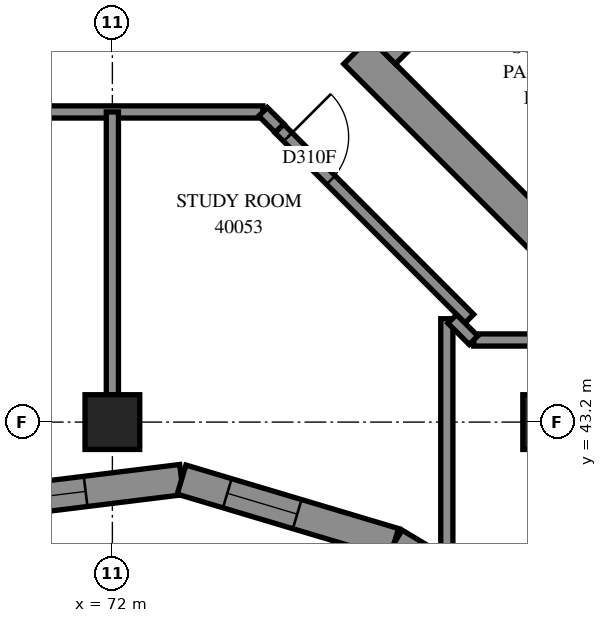
"""IFC4 building model, lengths in metres.
Left out: names, types, materials, properties, quantities, classifications, styles, units other than length and angle.
Written with IfcOpenShell. Run it as: python <this file> out.ifc"""

import sys

from ifc_helpers import new_model, si_unit, direction, frame, frame_2d, origin, origin_2d, place, context, subcontext, project, spatial, polyline, rectangle, outline, extrude, element, fill, save


model = new_model("IFC4")
c1 = context("Model", 3, precision=1e-05, world=origin(), true_north=direction((0.0, 1.0)))
c2 = subcontext(c1, "Body", "Model", "MODEL_VIEW")
j1 = project(units=[si_unit("LENGTHUNIT", "METRE"), si_unit("PLANEANGLEUNIT", "RADIAN")], contexts=[c1])
p1 = place(None, origin())
s1 = spatial("IfcSite", under=j1, at=p1, CompositionType="ELEMENT")
p2 = place(p1, origin())
s2 = spatial("IfcBuilding", under=s1, at=p2, CompositionType="ELEMENT")
p3 = place(p2, frame((0.0, 0.0, 149.0)))
s3 = spatial("IfcBuildingStorey", under=s2, at=p3, CompositionType="ELEMENT", Elevation=149.0)
for number, where, z_axis, x_axis in (
    (1, (72.0, 43.2, 0.0), (0.0, 0.0, 1.0), (1.0, 0.0, 0.0)),
    (2, (79.2, 43.2, 0.0), (0.0, 0.0, 1.0), (1.0, 0.0, 0.0)),
):
    element("IfcColumn", number, at=place(p3, frame(where, z_axis=z_axis, x_axis=x_axis)), inside=s3, PredefinedType="COLUMN", context=c2, shape_type="SweptSolid", body=[
        extrude(rectangle(XDim=0.9, YDim=0.9, at=origin_2d()), origin(), (0.0, 0.0, 1.0), 3.1),
    ])
p4 = place(p3, frame((76.018, 49.302, -0.3), z_axis=(0.0, 0.0, 1.0), x_axis=(0.7071067812, -0.7071067812, 0.0)))
e3 = element("IfcWall", 3, at=p4, inside=s3, PredefinedType="SHEAR", context=c2, shape_type="SweptSolid", body=[
    extrude(rectangle(XDim=15.6, YDim=0.6, at=frame_2d((7.8, 0.0))), origin(), (0.0, 0.0, 1.0), 2.7),
])
p5 = place(p3, frame((76.442, 49.302, -0.3), z_axis=(0.0, 0.0, 1.0), x_axis=(0.7071067812, 0.7071067812, 0.0)))
e4 = element("IfcWall", 4, at=p5, inside=s3, PredefinedType="SHEAR", context=c2, shape_type="SweptSolid", body=[
    extrude(rectangle(XDim=14.4, YDim=0.6, at=frame_2d((7.2, 0.0))), origin(), (0.0, 0.0, 1.0), 2.7),
])
p6 = place(p5, frame((4.55, 0.0, 0.3)))
e5 = element("IfcOpeningElement", 5, at=p6, cuts=e4, PredefinedType="OPENING", context=c2, shape_type="SweptSolid", body=[
    extrude(rectangle(XDim=1.1, YDim=2.1, at=frame_2d((0.55, 1.05))), frame((0.0, 0.31, 0.0), z_axis=(0.0, -1.0, 0.0), x_axis=(1.0, 0.0, 0.0)), (0.0, 0.0, 1.0), 0.62),
])
p7 = place(p5, frame((11.35, 0.0, 0.3)))
e6 = element("IfcOpeningElement", 6, at=p7, cuts=e4, PredefinedType="OPENING", context=c2, shape_type="SweptSolid", body=[
    extrude(rectangle(XDim=1.1, YDim=2.1, at=frame_2d((0.55, 1.05))), frame((0.0, 0.31, 0.0), z_axis=(0.0, -1.0, 0.0), x_axis=(1.0, 0.0, 0.0)), (0.0, 0.0, 1.0), 0.62),
])
p8 = place(p3, frame((69.7, 41.831, 0.0), z_axis=(0.0, 0.0, 1.0), x_axis=(0.99249528, 0.1222829472, 0.0)))
e7 = element("IfcWall", 7, at=p8, inside=s3, PredefinedType="SOLIDWALL", context=c2, shape_type="SweptSolid", body=[
    extrude(outline(polyline([(-0.031, -0.25), (3.412, -0.25), (3.516, 0.25), (0.031, 0.25), (-0.031, -0.25)])), origin(), (0.0, 0.0, 1.0), 3.1),
])
p9 = place(p8, frame((0.674, 0.0, 0.45)))
e8 = element("IfcOpeningElement", 8, at=p9, cuts=e7, PredefinedType="OPENING", context=c2, shape_type="SweptSolid", body=[
    extrude(rectangle(XDim=1.2, YDim=2.5, at=frame_2d((0.6, 1.25))), frame((0.0, 0.26, 0.0), z_axis=(0.0, -1.0, 0.0), x_axis=(1.0, 0.0, 0.0)), (0.0, 0.0, 1.0), 0.52),
])
p10 = place(p3, frame((73.138, 42.255, 0.0), z_axis=(0.0, 0.0, 1.0), x_axis=(0.9581356877, -0.2863145194, 0.0)))
e9 = element("IfcWall", 9, at=p10, inside=s3, PredefinedType="SOLIDWALL", context=c2, shape_type="SweptSolid", body=[
    extrude(outline(polyline([(0.052, -0.25), (3.618, -0.25), (3.681, 0.25), (-0.052, 0.25), (0.052, -0.25)])), origin(), (0.0, 0.0, 1.0), 3.1),
])
p11 = place(p10, frame((0.785, 0.0, 0.45)))
e10 = element("IfcOpeningElement", 10, at=p11, cuts=e9, PredefinedType="OPENING", context=c2, shape_type="SweptSolid", body=[
    extrude(rectangle(XDim=1.2, YDim=2.5, at=frame_2d((0.6, 1.25))), frame((0.0, 0.26, 0.0), z_axis=(0.0, -1.0, 0.0), x_axis=(1.0, 0.0, 0.0)), (0.0, 0.0, 1.0), 0.52),
])
p12 = place(p3, frame((76.635, 41.21, 0.0), z_axis=(0.0, 0.0, 1.0), x_axis=(0.8582520879, -0.513228364, 0.0)))
e11 = element("IfcWall", 11, at=p12, inside=s3, PredefinedType="SOLIDWALL", context=c2, shape_type="SweptSolid", body=[
    extrude(outline(polyline([(0.031, -0.25), (4.216, -0.25), (4.304, 0.25), (-0.031, 0.25), (0.031, -0.25)])), origin(), (0.0, 0.0, 1.0), 3.1),
])
p13 = place(p12, frame((0.347, 0.0, 0.45)))
e12 = element("IfcOpeningElement", 12, at=p13, cuts=e11, PredefinedType="OPENING", context=c2, shape_type="SweptSolid", body=[
    extrude(rectangle(XDim=1.2, YDim=2.5, at=frame_2d((0.6, 1.25))), frame((0.0, 0.26, 0.0), z_axis=(0.0, -1.0, 0.0), x_axis=(1.0, 0.0, 0.0)), (0.0, 0.0, 1.0), 0.52),
])
p14 = place(p12, frame((2.727, 0.0, 0.45)))
e13 = element("IfcOpeningElement", 13, at=p14, cuts=e11, PredefinedType="OPENING", context=c2, shape_type="SweptSolid", body=[
    extrude(rectangle(XDim=1.2, YDim=2.5, at=frame_2d((0.6, 1.25))), frame((0.0, 0.26, 0.0), z_axis=(0.0, -1.0, 0.0), x_axis=(1.0, 0.0, 0.0)), (0.0, 0.0, 1.0), 0.52),
])
p15 = place(p3, frame((55.5, 48.3, 0.0), z_axis=(0.0, 0.0, 1.0), x_axis=(1.0, 0.0, 0.0)))
e14 = element("IfcWall", 14, at=p15, inside=s3, PredefinedType="PARTITIONING", context=c2, shape_type="SweptSolid", body=[
    extrude(rectangle(XDim=18.974, YDim=0.2, at=frame_2d((9.487, 0.0))), origin(), (0.0, 0.0, 1.0), 3.1),
])
p16 = place(p15, frame((4.4, 0.0, 0.0)))
e15 = element("IfcOpeningElement", 15, at=p16, cuts=e14, PredefinedType="OPENING", context=c2, shape_type="SweptSolid", body=[
    extrude(rectangle(XDim=0.9, YDim=2.1, at=frame_2d((0.45, 1.05))), frame((0.0, 0.11, 0.0), z_axis=(0.0, -1.0, 0.0), x_axis=(1.0, 0.0, 0.0)), (0.0, 0.0, 1.0), 0.22),
])
p17 = place(p15, frame((6.1, 0.0, 0.0)))
e16 = element("IfcOpeningElement", 16, at=p17, cuts=e14, PredefinedType="OPENING", context=c2, shape_type="SweptSolid", body=[
    extrude(rectangle(XDim=0.9, YDim=2.1, at=frame_2d((0.45, 1.05))), frame((0.0, 0.11, 0.0), z_axis=(0.0, -1.0, 0.0), x_axis=(1.0, 0.0, 0.0)), (0.0, 0.0, 1.0), 0.22),
])
p18 = place(p15, frame((13.162, 0.0, 0.0)))
e17 = element("IfcOpeningElement", 17, at=p18, cuts=e14, PredefinedType="OPENING", context=c2, shape_type="SweptSolid", body=[
    extrude(rectangle(XDim=1.0, YDim=2.1, at=frame_2d((0.5, 1.05))), frame((0.0, 0.11, 0.0), z_axis=(0.0, -1.0, 0.0), x_axis=(1.0, 0.0, 0.0)), (0.0, 0.0, 1.0), 0.22),
])
p19 = place(p3, frame((72.0, 43.65, 0.0), z_axis=(0.0, 0.0, 1.0), x_axis=(0.0, 1.0, 0.0)))
e18 = element("IfcWall", 18, at=p19, inside=s3, PredefinedType="PARTITIONING", context=c2, shape_type="SweptSolid", body=[
    extrude(rectangle(XDim=4.65, YDim=0.2, at=frame_2d((2.325, 0.0))), origin(), (0.0, 0.0, 1.0), 3.1),
])
p20 = place(p3, frame((74.745, 48.029, 0.0), z_axis=(0.0, 0.0, 1.0), x_axis=(0.7068806156, -0.7073328745, 0.0)))
e19 = element("IfcWall", 19, at=p20, inside=s3, PredefinedType="PARTITIONING", context=c2, shape_type="SweptSolid", body=[
    extrude(rectangle(XDim=4.422, YDim=0.2, at=frame_2d((2.211, 0.0))), origin(), (0.0, 0.0, 1.0), 3.1),
])
p21 = place(p20, frame((0.199, 0.0, 0.0)))
e20 = element("IfcOpeningElement", 20, at=p21, cuts=e19, PredefinedType="OPENING", context=c2, shape_type="SweptSolid", body=[
    extrude(rectangle(XDim=1.0, YDim=2.1, at=frame_2d((0.5, 1.05))), frame((0.0, 0.11, 0.0), z_axis=(0.0, -1.0, 0.0), x_axis=(1.0, 0.0, 0.0)), (0.0, 0.0, 1.0), 0.22),
])
p22 = place(p3, frame((77.5, 40.983, 0.0), z_axis=(0.0, 0.0, 1.0), x_axis=(0.0, 1.0, 0.0)))
e21 = element("IfcWall", 21, at=p22, inside=s3, PredefinedType="PARTITIONING", context=c2, shape_type="SweptSolid", body=[
    extrude(rectangle(XDim=3.917, YDim=0.2, at=frame_2d((1.958, 0.0))), origin(), (0.0, 0.0, 1.0), 3.1),
])
p23 = place(p3, frame((77.942, 44.55, 0.0), z_axis=(0.0, 0.0, 1.0), x_axis=(1.0, 0.0, 0.0)))
e22 = element("IfcWall", 22, at=p23, inside=s3, PredefinedType="PARTITIONING", context=c2, shape_type="SweptSolid", body=[
    extrude(rectangle(XDim=2.29, YDim=0.2, at=frame_2d((1.145, 0.0))), origin(), (0.0, 0.0, 1.0), 3.1),
])
p24 = place(p3, frame((77.588, 44.897, 0.0), z_axis=(0.0, 0.0, 1.0), x_axis=(0.7071067812, -0.7071067812, 0.0)))
e23 = element("IfcWall", 23, at=p24, inside=s3, PredefinedType="PARTITIONING", context=c2, shape_type="SweptSolid", body=[
    extrude(rectangle(XDim=0.495, YDim=0.2, at=frame_2d((0.247, 0.0))), origin(), (0.0, 0.0, 1.0), 3.1),
])
p25 = place(p3, frame((74.477, 48.303, 0.0), z_axis=(0.0, 0.0, 1.0), x_axis=(0.7097111995, -0.7044927348, 0.0)))
e24 = element("IfcWall", 24, at=p25, inside=s3, PredefinedType="PARTITIONING", context=c2, shape_type="SweptSolid", body=[
    extrude(rectangle(XDim=0.383, YDim=0.2, at=frame_2d((0.192, 0.0))), origin(), (0.0, 0.0, 1.0), 3.1),
])
p26 = place(p9, origin())
e25 = element("IfcWindow", 25, at=p26, inside=s3, PartitioningType="SINGLE_PANEL", PredefinedType="WINDOW", context=c2, shape_type="SweptSolid", body=[
    extrude(rectangle(XDim=1.2, YDim=2.5, at=frame_2d((0.6, 1.25))), frame((0.0, 0.18, 0.0), z_axis=(0.0, -1.0, 0.0), x_axis=(1.0, 0.0, 0.0)), (0.0, 0.0, 1.0), 0.06),
])
fill(e8, e25)
p27 = place(p11, origin())
e26 = element("IfcWindow", 26, at=p27, inside=s3, PartitioningType="SINGLE_PANEL", PredefinedType="WINDOW", context=c2, shape_type="SweptSolid", body=[
    extrude(rectangle(XDim=1.2, YDim=2.5, at=frame_2d((0.6, 1.25))), frame((0.0, 0.18, 0.0), z_axis=(0.0, -1.0, 0.0), x_axis=(1.0, 0.0, 0.0)), (0.0, 0.0, 1.0), 0.06),
])
fill(e10, e26)
p28 = place(p21, origin())
e27 = element("IfcDoor", 27, at=p28, inside=s3, OperationType="SINGLE_SWING_LEFT", PredefinedType="DOOR", context=c2, shape_type="SweptSolid", body=[
    extrude(rectangle(XDim=1.0, YDim=2.1, at=frame_2d((0.5, 1.05))), frame((0.0, 0.025, 0.0), z_axis=(0.0, -1.0, 0.0), x_axis=(1.0, 0.0, 0.0)), (0.0, 0.0, 1.0), 0.05),
])
fill(e20, e27)
save(model, sys.argv[1])
